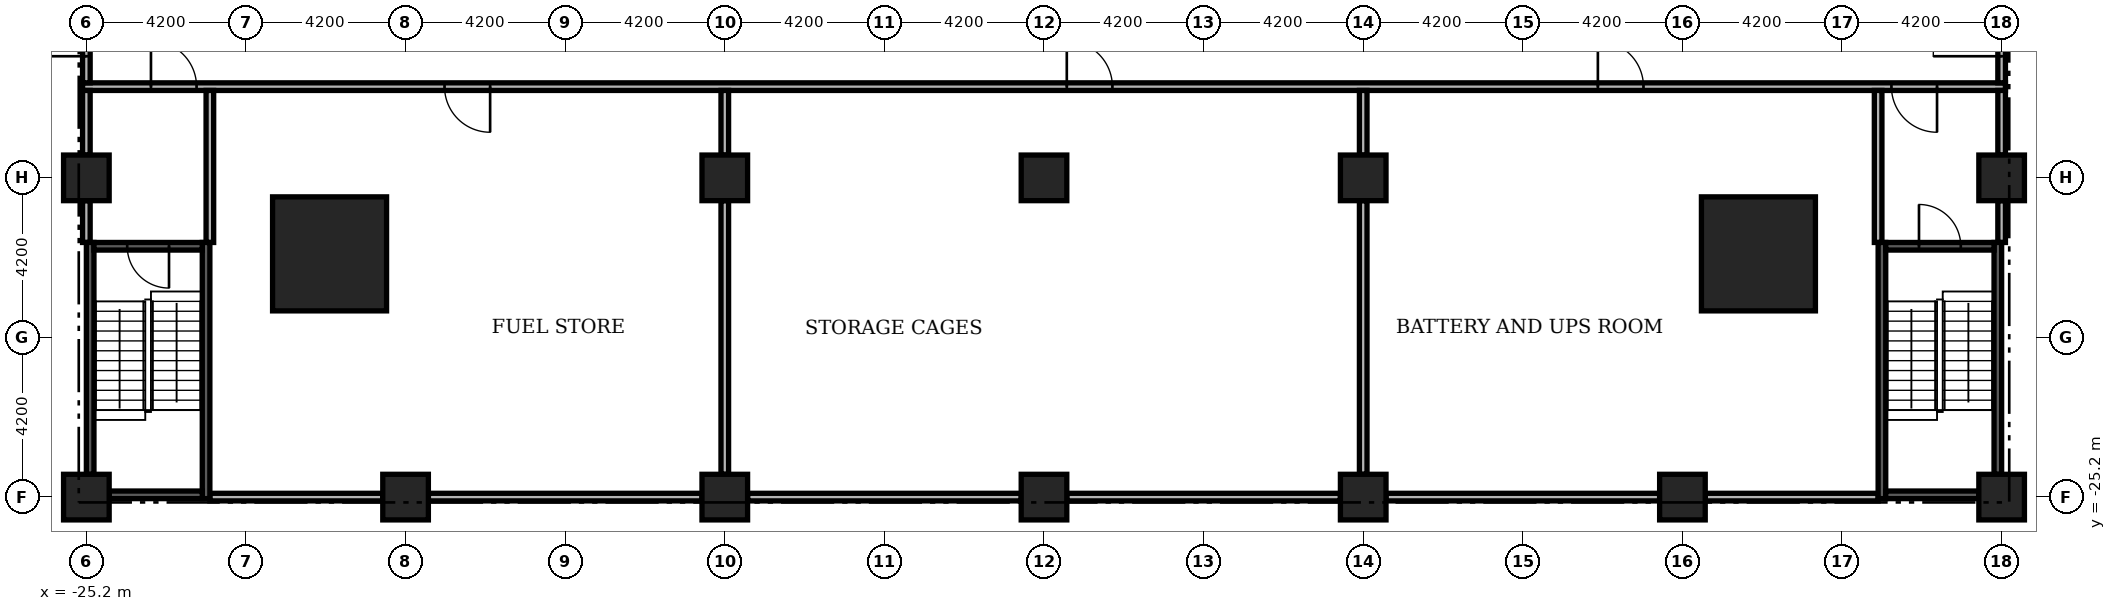
"""IFC4 building model, lengths in metres.
Left out: names, types, materials, properties, quantities, classifications, styles, units other than length and angle.
Written with IfcOpenShell. Run it as: python <this file> out.ifc"""

import sys

from ifc_helpers import new_model, si_unit, direction, frame, frame_2d, origin, origin_2d, place, context, subcontext, project, spatial, rectangle, extrude, element, fill, save


model = new_model("IFC4")
c1 = context("Model", 3, precision=1e-05, world=origin(), true_north=direction((0.0, 1.0)))
c2 = subcontext(c1, "Body", "Model", "MODEL_VIEW")
j1 = project(units=[si_unit("LENGTHUNIT", "METRE"), si_unit("PLANEANGLEUNIT", "RADIAN")], contexts=[c1])
p1 = place(None, origin())
s1 = spatial("IfcSite", under=j1, at=p1, CompositionType="ELEMENT")
p2 = place(p1, origin())
s2 = spatial("IfcBuilding", under=s1, at=p2, CompositionType="ELEMENT")
p3 = place(p2, frame((0.0, 0.0, -8.4)))
s3 = spatial("IfcBuildingStorey", under=s2, at=p3, CompositionType="ELEMENT", Elevation=-8.4)
for number, where, z_axis, x_axis in (
    (1, (18.8, -18.8, 0.0), (0.0, 0.0, 1.0), (1.0, 0.0, 0.0)),
    (2, (-18.8, -18.8, 0.0), (0.0, 0.0, 1.0), (1.0, 0.0, 0.0)),
):
    element("IfcColumn", number, at=place(p3, frame(where, z_axis=z_axis, x_axis=x_axis)), inside=s3, PredefinedType="COLUMN", context=c2, shape_type="SweptSolid", body=[
        extrude(rectangle(XDim=3.0, YDim=3.0, at=origin_2d()), origin(), (0.0, 0.0, 1.0), 4.2),
    ])
for number, where, z_axis, x_axis in (
    (3, (25.2, -16.8, 0.0), (0.0, 0.0, 1.0), (1.0, 0.0, 0.0)),
    (4, (0.0, -25.2, 0.0), (0.0, 0.0, 1.0), (1.0, 0.0, 0.0)),
    (5, (8.4, -25.2, 0.0), (0.0, 0.0, 1.0), (1.0, 0.0, 0.0)),
    (6, (16.8, -25.2, 0.0), (0.0, 0.0, 1.0), (1.0, 0.0, 0.0)),
    (7, (-8.4, -25.2, 0.0), (0.0, 0.0, 1.0), (1.0, 0.0, 0.0)),
    (8, (-16.8, -25.2, 0.0), (0.0, 0.0, 1.0), (1.0, 0.0, 0.0)),
    (9, (-25.2, -16.8, 0.0), (0.0, 0.0, 1.0), (1.0, 0.0, 0.0)),
    (10, (0.0, -16.8, 0.0), (0.0, 0.0, 1.0), (1.0, 0.0, 0.0)),
    (11, (8.4, -16.8, 0.0), (0.0, 0.0, 1.0), (1.0, 0.0, 0.0)),
    (12, (25.2, -25.2, 0.0), (0.0, 0.0, 1.0), (1.0, 0.0, 0.0)),
    (13, (-8.4, -16.8, 0.0), (0.0, 0.0, 1.0), (1.0, 0.0, 0.0)),
    (14, (-25.2, -25.2, 0.0), (0.0, 0.0, 1.0), (1.0, 0.0, 0.0)),
):
    element("IfcColumn", number, at=place(p3, frame(where, z_axis=z_axis, x_axis=x_axis)), inside=s3, PredefinedType="COLUMN", context=c2, shape_type="SweptSolid", body=[
        extrude(rectangle(XDim=1.2, YDim=1.2, at=origin_2d()), origin(), (0.0, 0.0, 1.0), 4.2),
    ])
p4 = place(p3, frame((-21.95, -25.2, 0.0), z_axis=(0.0, 0.0, 1.0), x_axis=(1.0, 0.0, 0.0)))
e15 = element("IfcWall", 15, at=p4, inside=s3, PredefinedType="PARTITIONING", context=c2, shape_type="SweptSolid", body=[
    extrude(rectangle(XDim=4.55, YDim=0.2, at=frame_2d((2.275, 0.0))), origin(), (0.0, 0.0, 1.0), 3.85),
])
for number, where, z_axis, x_axis in (
    (16, (-16.2, -25.2, 0.0), (0.0, 0.0, 1.0), (1.0, 0.0, 0.0)),
    (17, (-7.8, -25.2, 0.0), (0.0, 0.0, 1.0), (1.0, 0.0, 0.0)),
    (18, (0.6, -25.2, 0.0), (0.0, 0.0, 1.0), (1.0, 0.0, 0.0)),
    (19, (9.0, -25.2, 0.0), (0.0, 0.0, 1.0), (1.0, 0.0, 0.0)),
):
    element("IfcWall", number, at=place(p3, frame(where, z_axis=z_axis, x_axis=x_axis)), inside=s3, PredefinedType="PARTITIONING", context=c2, shape_type="SweptSolid", body=[
        extrude(rectangle(XDim=7.2, YDim=0.2, at=frame_2d((3.6, 0.0))), origin(), (0.0, 0.0, 1.0), 3.85),
    ])
p5 = place(p3, frame((17.4, -25.2, 0.0), z_axis=(0.0, 0.0, 1.0), x_axis=(1.0, 0.0, 0.0)))
e20 = element("IfcWall", 20, at=p5, inside=s3, PredefinedType="PARTITIONING", context=c2, shape_type="SweptSolid", body=[
    extrude(rectangle(XDim=4.55, YDim=0.2, at=frame_2d((2.275, 0.0))), origin(), (0.0, 0.0, 1.0), 3.85),
])
p6 = place(p3, frame((-25.3, -14.4, 0.0), z_axis=(0.0, 0.0, 1.0), x_axis=(1.0, 0.0, 0.0)))
e21 = element("IfcWall", 21, at=p6, inside=s3, PredefinedType="PARTITIONING", context=c2, shape_type="SweptSolid", body=[
    extrude(rectangle(XDim=50.6, YDim=0.2, at=frame_2d((25.3, 0.0))), origin(), (0.0, 0.0, 1.0), 3.85),
])
p7 = place(p6, frame((1.8, 0.0, 0.0)))
e22 = element("IfcOpeningElement", 22, at=p7, cuts=e21, PredefinedType="OPENING", context=c2, shape_type="SweptSolid", body=[
    extrude(rectangle(XDim=1.2, YDim=2.2, at=frame_2d((0.6, 1.1))), frame((0.0, 0.11, 0.0), z_axis=(0.0, -1.0, 0.0), x_axis=(1.0, 0.0, 0.0)), (0.0, 0.0, 1.0), 0.22),
])
p8 = place(p6, frame((9.525, 0.0, 0.0)))
e23 = element("IfcOpeningElement", 23, at=p8, cuts=e21, PredefinedType="OPENING", context=c2, shape_type="SweptSolid", body=[
    extrude(rectangle(XDim=1.2, YDim=2.2, at=frame_2d((0.6, 1.1))), frame((0.0, 0.11, 0.0), z_axis=(0.0, -1.0, 0.0), x_axis=(1.0, 0.0, 0.0)), (0.0, 0.0, 1.0), 0.22),
])
p9 = place(p6, frame((25.9, 0.0, 0.0)))
e24 = element("IfcOpeningElement", 24, at=p9, cuts=e21, PredefinedType="OPENING", context=c2, shape_type="SweptSolid", body=[
    extrude(rectangle(XDim=1.2, YDim=2.2, at=frame_2d((0.6, 1.1))), frame((0.0, 0.11, 0.0), z_axis=(0.0, -1.0, 0.0), x_axis=(1.0, 0.0, 0.0)), (0.0, 0.0, 1.0), 0.22),
])
p10 = place(p6, frame((39.875, 0.0, 0.0)))
e25 = element("IfcOpeningElement", 25, at=p10, cuts=e21, PredefinedType="OPENING", context=c2, shape_type="SweptSolid", body=[
    extrude(rectangle(XDim=1.2, YDim=2.2, at=frame_2d((0.6, 1.1))), frame((0.0, 0.11, 0.0), z_axis=(0.0, -1.0, 0.0), x_axis=(1.0, 0.0, 0.0)), (0.0, 0.0, 1.0), 0.22),
])
p11 = place(p6, frame((47.6, 0.0, 0.0)))
e26 = element("IfcOpeningElement", 26, at=p11, cuts=e21, PredefinedType="OPENING", context=c2, shape_type="SweptSolid", body=[
    extrude(rectangle(XDim=1.2, YDim=2.2, at=frame_2d((0.6, 1.1))), frame((0.0, 0.11, 0.0), z_axis=(0.0, -1.0, 0.0), x_axis=(1.0, 0.0, 0.0)), (0.0, 0.0, 1.0), 0.22),
])
p12 = place(p3, frame((-25.2, -18.5, 0.0), z_axis=(0.0, 0.0, 1.0), x_axis=(0.0, 1.0, 0.0)))
e27 = element("IfcWall", 27, at=p12, inside=s3, PredefinedType="PARTITIONING", context=c2, shape_type="SweptSolid", body=[
    extrude(rectangle(XDim=1.1, YDim=0.2, at=frame_2d((0.55, 0.0))), origin(), (0.0, 0.0, 1.0), 3.85),
])
p13 = place(p3, frame((-25.2, -16.2, 0.0), z_axis=(0.0, 0.0, 1.0), x_axis=(0.0, 1.0, 0.0)))
e28 = element("IfcWall", 28, at=p13, inside=s3, PredefinedType="PARTITIONING", context=c2, shape_type="SweptSolid", body=[
    extrude(rectangle(XDim=1.7, YDim=0.2, at=frame_2d((0.85, 0.0))), origin(), (0.0, 0.0, 1.0), 3.85),
])
p14 = place(p3, frame((-25.2, -14.3, 0.0), z_axis=(0.0, 0.0, 1.0), x_axis=(0.0, 1.0, 0.0)))
e29 = element("IfcWall", 29, at=p14, inside=s3, PredefinedType="PARTITIONING", context=c2, shape_type="SweptSolid", body=[
    extrude(rectangle(XDim=3.2, YDim=0.2, at=frame_2d((1.6, 0.0))), origin(), (0.0, 0.0, 1.0), 3.85),
])
p15 = place(p14, frame((0.7, 0.0, 0.0)))
e30 = element("IfcOpeningElement", 30, at=p15, cuts=e29, PredefinedType="OPENING", context=c2, shape_type="SweptSolid", body=[
    extrude(rectangle(XDim=1.8, YDim=2.2, at=frame_2d((0.9, 1.1))), frame((0.0, 0.11, 0.0), z_axis=(0.0, -1.0, 0.0), x_axis=(1.0, 0.0, 0.0)), (0.0, 0.0, 1.0), 0.22),
])
p16 = place(p3, frame((-21.95, -18.5, 0.0), z_axis=(0.0, 0.0, 1.0), x_axis=(0.0, 1.0, 0.0)))
e31 = element("IfcWall", 31, at=p16, inside=s3, PredefinedType="PARTITIONING", context=c2, shape_type="SweptSolid", body=[
    extrude(rectangle(XDim=4.0, YDim=0.2, at=frame_2d((2.0, 0.0))), origin(), (0.0, 0.0, 1.0), 3.85),
])
p17 = place(p3, frame((-8.4, -24.6, 0.0), z_axis=(0.0, 0.0, 1.0), x_axis=(0.0, 1.0, 0.0)))
e32 = element("IfcWall", 32, at=p17, inside=s3, PredefinedType="PARTITIONING", context=c2, shape_type="SweptSolid", body=[
    extrude(rectangle(XDim=7.2, YDim=0.2, at=frame_2d((3.6, 0.0))), origin(), (0.0, 0.0, 1.0), 3.85),
])
p18 = place(p3, frame((-8.4, -16.2, 0.0), z_axis=(0.0, 0.0, 1.0), x_axis=(0.0, 1.0, 0.0)))
e33 = element("IfcWall", 33, at=p18, inside=s3, PredefinedType="PARTITIONING", context=c2, shape_type="SweptSolid", body=[
    extrude(rectangle(XDim=1.7, YDim=0.2, at=frame_2d((0.85, 0.0))), origin(), (0.0, 0.0, 1.0), 3.85),
])
p19 = place(p3, frame((8.4, -24.6, 0.0), z_axis=(0.0, 0.0, 1.0), x_axis=(0.0, 1.0, 0.0)))
e34 = element("IfcWall", 34, at=p19, inside=s3, PredefinedType="PARTITIONING", context=c2, shape_type="SweptSolid", body=[
    extrude(rectangle(XDim=7.2, YDim=0.2, at=frame_2d((3.6, 0.0))), origin(), (0.0, 0.0, 1.0), 3.85),
])
p20 = place(p3, frame((8.4, -16.2, 0.0), z_axis=(0.0, 0.0, 1.0), x_axis=(0.0, 1.0, 0.0)))
e35 = element("IfcWall", 35, at=p20, inside=s3, PredefinedType="PARTITIONING", context=c2, shape_type="SweptSolid", body=[
    extrude(rectangle(XDim=1.7, YDim=0.2, at=frame_2d((0.85, 0.0))), origin(), (0.0, 0.0, 1.0), 3.85),
])
p21 = place(p3, frame((21.95, -18.5, 0.0), z_axis=(0.0, 0.0, 1.0), x_axis=(0.0, 1.0, 0.0)))
e36 = element("IfcWall", 36, at=p21, inside=s3, PredefinedType="PARTITIONING", context=c2, shape_type="SweptSolid", body=[
    extrude(rectangle(XDim=4.0, YDim=0.2, at=frame_2d((2.0, 0.0))), origin(), (0.0, 0.0, 1.0), 3.85),
])
p22 = place(p3, frame((25.2, -18.5, 0.0), z_axis=(0.0, 0.0, 1.0), x_axis=(0.0, 1.0, 0.0)))
e37 = element("IfcWall", 37, at=p22, inside=s3, PredefinedType="PARTITIONING", context=c2, shape_type="SweptSolid", body=[
    extrude(rectangle(XDim=1.1, YDim=0.2, at=frame_2d((0.55, 0.0))), origin(), (0.0, 0.0, 1.0), 3.85),
])
p23 = place(p3, frame((25.2, -16.2, 0.0), z_axis=(0.0, 0.0, 1.0), x_axis=(0.0, 1.0, 0.0)))
e38 = element("IfcWall", 38, at=p23, inside=s3, PredefinedType="PARTITIONING", context=c2, shape_type="SweptSolid", body=[
    extrude(rectangle(XDim=1.7, YDim=0.2, at=frame_2d((0.85, 0.0))), origin(), (0.0, 0.0, 1.0), 3.85),
])
p24 = place(p3, frame((25.2, -14.3, 0.0), z_axis=(0.0, 0.0, 1.0), x_axis=(0.0, 1.0, 0.0)))
e39 = element("IfcWall", 39, at=p24, inside=s3, PredefinedType="PARTITIONING", context=c2, shape_type="SweptSolid", body=[
    extrude(rectangle(XDim=3.2, YDim=0.2, at=frame_2d((1.6, 0.0))), origin(), (0.0, 0.0, 1.0), 3.85),
])
p25 = place(p24, frame((0.7, 0.0, 0.0)))
e40 = element("IfcOpeningElement", 40, at=p25, cuts=e39, PredefinedType="OPENING", context=c2, shape_type="SweptSolid", body=[
    extrude(rectangle(XDim=1.8, YDim=2.2, at=frame_2d((0.9, 1.1))), frame((0.0, 0.11, 0.0), z_axis=(0.0, -1.0, 0.0), x_axis=(1.0, 0.0, 0.0)), (0.0, 0.0, 1.0), 0.22),
])
p26 = place(p3, frame((22.05, -25.24, 0.0), z_axis=(0.0, 0.0, 1.0), x_axis=(0.0, 1.0, 0.0)))
e41 = element("IfcWall", 41, at=p26, inside=s3, PredefinedType="SOLIDWALL", context=c2, shape_type="SweptSolid", body=[
    extrude(rectangle(XDim=6.74, YDim=0.2, at=frame_2d((3.37, 0.0))), origin(), (0.0, 0.0, 1.0), 3.85),
])
p27 = place(p3, frame((25.1, -24.6, 0.0), z_axis=(0.0, 0.0, 1.0), x_axis=(0.0, 1.0, 0.0)))
e42 = element("IfcWall", 42, at=p27, inside=s3, PredefinedType="SOLIDWALL", context=c2, shape_type="SweptSolid", body=[
    extrude(rectangle(XDim=6.1, YDim=0.2, at=frame_2d((3.05, 0.0))), origin(), (0.0, 0.0, 1.0), 3.85),
])
p28 = place(p3, frame((22.15, -25.14, 0.0), z_axis=(0.0, 0.0, 1.0), x_axis=(1.0, 0.0, 0.0)))
e43 = element("IfcWall", 43, at=p28, inside=s3, PredefinedType="SOLIDWALL", context=c2, shape_type="SweptSolid", body=[
    extrude(rectangle(XDim=2.45, YDim=0.2, at=frame_2d((1.225, 0.0))), origin(), (0.0, 0.0, 1.0), 3.85),
])
p29 = place(p3, frame((22.15, -18.6, 0.0), z_axis=(0.0, 0.0, 1.0), x_axis=(1.0, 0.0, 0.0)))
e44 = element("IfcWall", 44, at=p29, inside=s3, PredefinedType="SOLIDWALL", context=c2, shape_type="SweptSolid", body=[
    extrude(rectangle(XDim=2.85, YDim=0.2, at=frame_2d((1.425, 0.0))), origin(), (0.0, 0.0, 1.0), 3.85),
])
p30 = place(p29, frame((0.875, 0.0, 0.0)))
e45 = element("IfcOpeningElement", 45, at=p30, cuts=e44, PredefinedType="OPENING", context=c2, shape_type="SweptSolid", body=[
    extrude(rectangle(XDim=1.1, YDim=2.2, at=frame_2d((0.55, 1.1))), frame((0.0, 0.11, 0.0), z_axis=(0.0, -1.0, 0.0), x_axis=(1.0, 0.0, 0.0)), (0.0, 0.0, 1.0), 0.22),
])
p31 = place(p3, frame((-25.1, -24.6, 0.0), z_axis=(0.0, 0.0, 1.0), x_axis=(0.0, 1.0, 0.0)))
e46 = element("IfcWall", 46, at=p31, inside=s3, PredefinedType="SOLIDWALL", context=c2, shape_type="SweptSolid", body=[
    extrude(rectangle(XDim=6.1, YDim=0.2, at=frame_2d((3.05, 0.0))), origin(), (0.0, 0.0, 1.0), 3.85),
])
p32 = place(p3, frame((-22.05, -25.24, 0.0), z_axis=(0.0, 0.0, 1.0), x_axis=(0.0, 1.0, 0.0)))
e47 = element("IfcWall", 47, at=p32, inside=s3, PredefinedType="SOLIDWALL", context=c2, shape_type="SweptSolid", body=[
    extrude(rectangle(XDim=6.74, YDim=0.2, at=frame_2d((3.37, 0.0))), origin(), (0.0, 0.0, 1.0), 3.85),
])
p33 = place(p3, frame((-24.6, -25.14, 0.0), z_axis=(0.0, 0.0, 1.0), x_axis=(1.0, 0.0, 0.0)))
e48 = element("IfcWall", 48, at=p33, inside=s3, PredefinedType="SOLIDWALL", context=c2, shape_type="SweptSolid", body=[
    extrude(rectangle(XDim=2.45, YDim=0.2, at=frame_2d((1.225, 0.0))), origin(), (0.0, 0.0, 1.0), 3.85),
])
p34 = place(p3, frame((-25.0, -18.6, 0.0), z_axis=(0.0, 0.0, 1.0), x_axis=(1.0, 0.0, 0.0)))
e49 = element("IfcWall", 49, at=p34, inside=s3, PredefinedType="SOLIDWALL", context=c2, shape_type="SweptSolid", body=[
    extrude(rectangle(XDim=2.85, YDim=0.2, at=frame_2d((1.425, 0.0))), origin(), (0.0, 0.0, 1.0), 3.85),
])
p35 = place(p34, frame((0.875, 0.0, 0.0)))
e50 = element("IfcOpeningElement", 50, at=p35, cuts=e49, PredefinedType="OPENING", context=c2, shape_type="SweptSolid", body=[
    extrude(rectangle(XDim=1.1, YDim=2.2, at=frame_2d((0.55, 1.1))), frame((0.0, 0.11, 0.0), z_axis=(0.0, -1.0, 0.0), x_axis=(1.0, 0.0, 0.0)), (0.0, 0.0, 1.0), 0.22),
])
p36 = place(p7, origin())
e51 = element("IfcDoor", 51, at=p36, inside=s3, OperationType="SINGLE_SWING_LEFT", PredefinedType="DOOR", context=c2, shape_type="SweptSolid", body=[
    extrude(rectangle(XDim=1.2, YDim=2.2, at=frame_2d((0.6, 1.1))), frame((0.0, 0.025, 0.0), z_axis=(0.0, -1.0, 0.0), x_axis=(1.0, 0.0, 0.0)), (0.0, 0.0, 1.0), 0.05),
])
fill(e22, e51)
p37 = place(p8, origin())
e52 = element("IfcDoor", 52, at=p37, inside=s3, OperationType="SINGLE_SWING_RIGHT", PredefinedType="DOOR", context=c2, shape_type="SweptSolid", body=[
    extrude(rectangle(XDim=1.2, YDim=2.2, at=frame_2d((0.6, 1.1))), frame((0.0, 0.025, 0.0), z_axis=(0.0, -1.0, 0.0), x_axis=(1.0, 0.0, 0.0)), (0.0, 0.0, 1.0), 0.05),
])
fill(e23, e52)
p38 = place(p9, origin())
e53 = element("IfcDoor", 53, at=p38, inside=s3, OperationType="SINGLE_SWING_LEFT", PredefinedType="DOOR", context=c2, shape_type="SweptSolid", body=[
    extrude(rectangle(XDim=1.2, YDim=2.2, at=frame_2d((0.6, 1.1))), frame((0.0, 0.025, 0.0), z_axis=(0.0, -1.0, 0.0), x_axis=(1.0, 0.0, 0.0)), (0.0, 0.0, 1.0), 0.05),
])
fill(e24, e53)
p39 = place(p10, origin())
e54 = element("IfcDoor", 54, at=p39, inside=s3, OperationType="SINGLE_SWING_LEFT", PredefinedType="DOOR", context=c2, shape_type="SweptSolid", body=[
    extrude(rectangle(XDim=1.2, YDim=2.2, at=frame_2d((0.6, 1.1))), frame((0.0, 0.025, 0.0), z_axis=(0.0, -1.0, 0.0), x_axis=(1.0, 0.0, 0.0)), (0.0, 0.0, 1.0), 0.05),
])
fill(e25, e54)
p40 = place(p11, origin())
e55 = element("IfcDoor", 55, at=p40, inside=s3, OperationType="SINGLE_SWING_RIGHT", PredefinedType="DOOR", context=c2, shape_type="SweptSolid", body=[
    extrude(rectangle(XDim=1.2, YDim=2.2, at=frame_2d((0.6, 1.1))), frame((0.0, 0.025, 0.0), z_axis=(0.0, -1.0, 0.0), x_axis=(1.0, 0.0, 0.0)), (0.0, 0.0, 1.0), 0.05),
])
fill(e26, e55)
p41 = place(p15, origin())
e56 = element("IfcDoor", 56, at=p41, inside=s3, OperationType="DOUBLE_DOOR_SINGLE_SWING", PredefinedType="DOOR", context=c2, shape_type="SweptSolid", body=[
    extrude(rectangle(XDim=1.8, YDim=2.2, at=frame_2d((0.9, 1.1))), frame((0.0, 0.025, 0.0), z_axis=(0.0, -1.0, 0.0), x_axis=(1.0, 0.0, 0.0)), (0.0, 0.0, 1.0), 0.05),
])
fill(e30, e56)
p42 = place(p25, origin())
e57 = element("IfcDoor", 57, at=p42, inside=s3, OperationType="DOUBLE_DOOR_SINGLE_SWING", PredefinedType="DOOR", context=c2, shape_type="SweptSolid", body=[
    extrude(rectangle(XDim=1.8, YDim=2.2, at=frame_2d((0.9, 1.1))), frame((0.0, 0.025, 0.0), z_axis=(0.0, -1.0, 0.0), x_axis=(1.0, 0.0, 0.0)), (0.0, 0.0, 1.0), 0.05),
])
fill(e40, e57)
p43 = place(p30, origin())
e58 = element("IfcDoor", 58, at=p43, inside=s3, OperationType="SINGLE_SWING_LEFT", PredefinedType="DOOR", context=c2, shape_type="SweptSolid", body=[
    extrude(rectangle(XDim=1.1, YDim=2.2, at=frame_2d((0.55, 1.1))), frame((0.0, 0.025, 0.0), z_axis=(0.0, -1.0, 0.0), x_axis=(1.0, 0.0, 0.0)), (0.0, 0.0, 1.0), 0.05),
])
fill(e45, e58)
p44 = place(p35, origin())
e59 = element("IfcDoor", 59, at=p44, inside=s3, OperationType="SINGLE_SWING_RIGHT", PredefinedType="DOOR", context=c2, shape_type="SweptSolid", body=[
    extrude(rectangle(XDim=1.1, YDim=2.2, at=frame_2d((0.55, 1.1))), frame((0.0, 0.025, 0.0), z_axis=(0.0, -1.0, 0.0), x_axis=(1.0, 0.0, 0.0)), (0.0, 0.0, 1.0), 0.05),
])
fill(e50, e59)
save(model, sys.argv[1])
